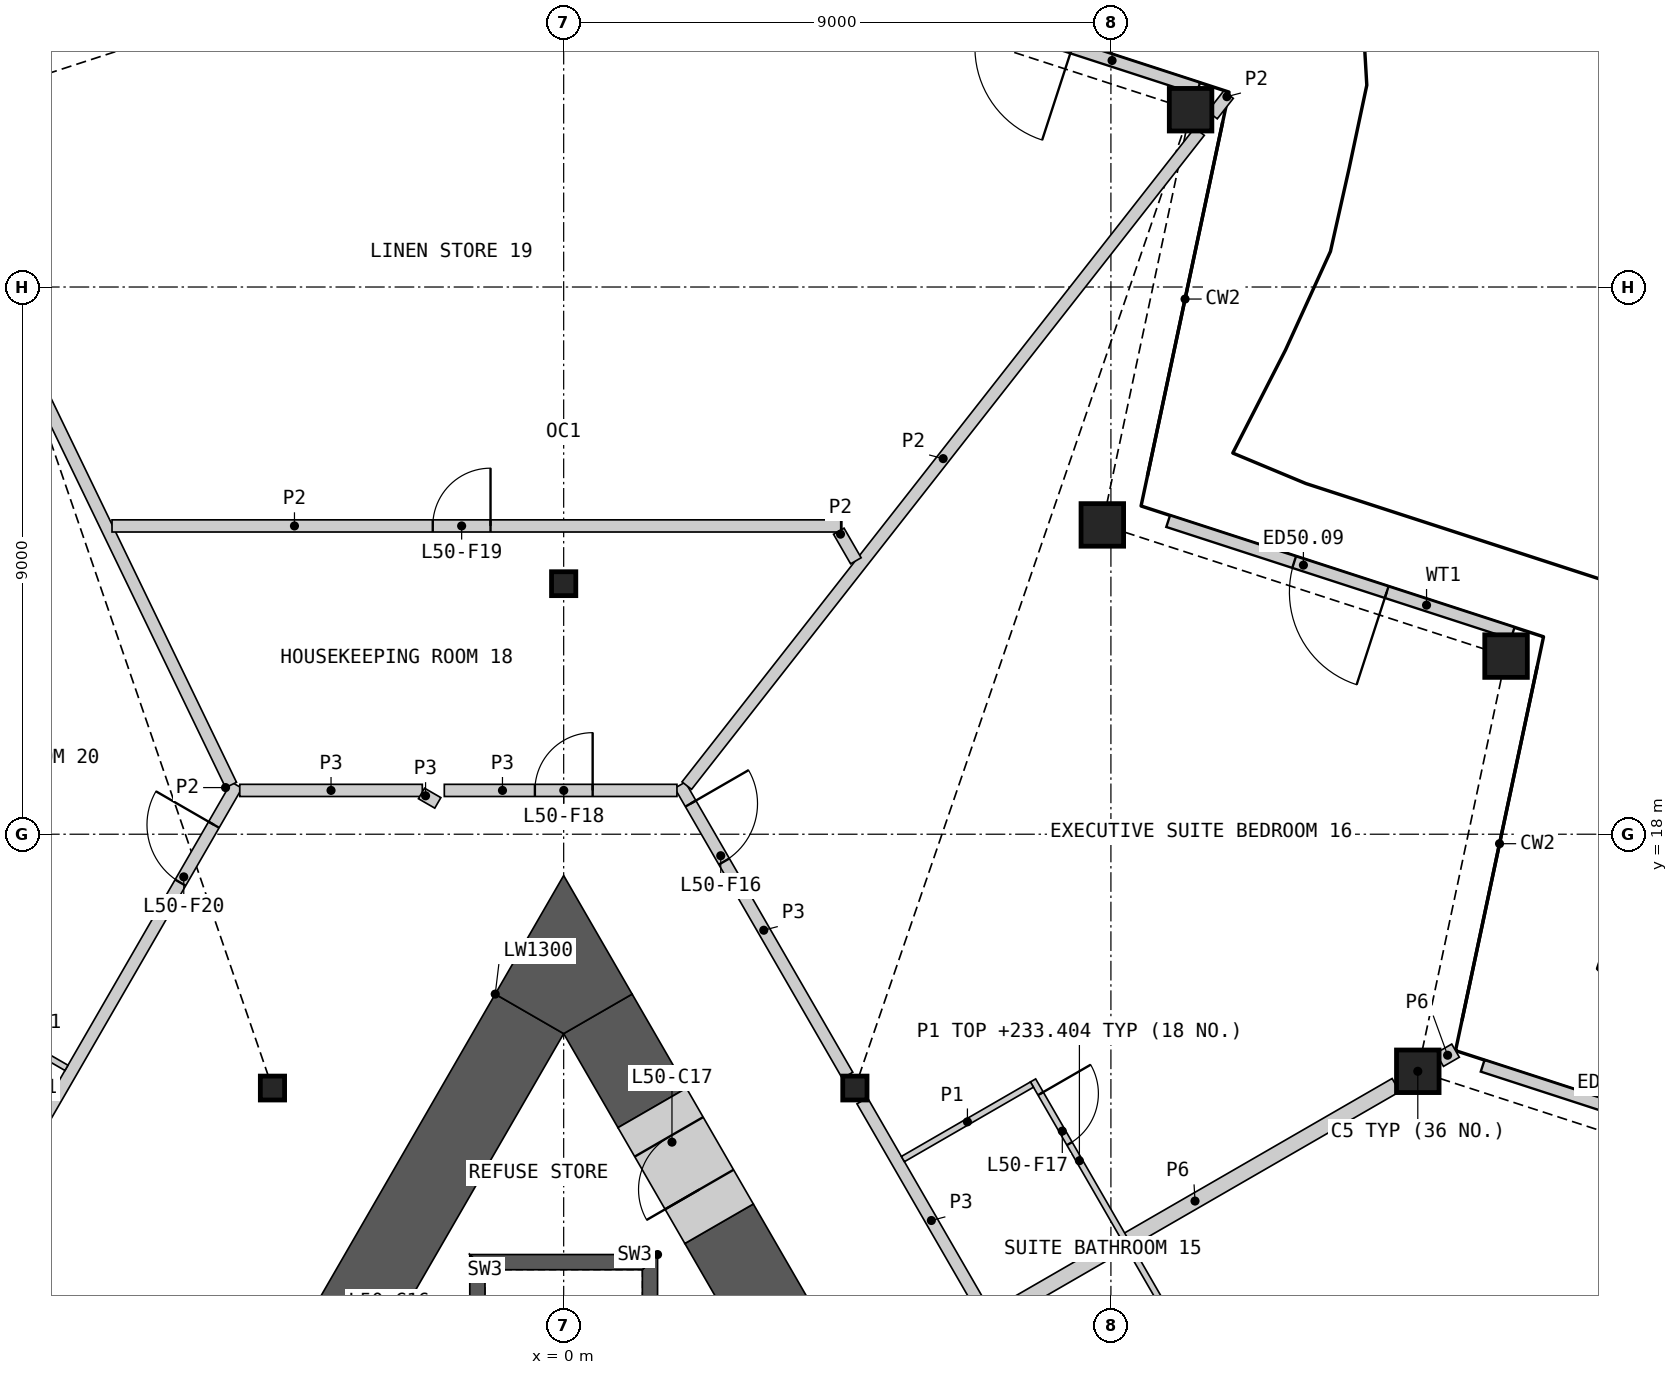
"""IFC4 building model, lengths in metres.
Left out: names, types, materials, properties, quantities, classifications, styles, units other than length and angle.
Written with IfcOpenShell. Run it as: python <this file> out.ifc"""

import sys

from ifc_helpers import new_model, si_unit, direction, frame, frame_2d, origin, origin_2d, place, context, subcontext, project, spatial, polyline, rectangle, hollow_rectangle, i_section, outline, extrude, element, fill, save


model = new_model("IFC4")
c1 = context("Model", 3, precision=1e-05, world=origin(), true_north=direction((0.0, 1.0)))
c2 = subcontext(c1, "Body", "Model", "MODEL_VIEW")
j1 = project(units=[si_unit("LENGTHUNIT", "METRE"), si_unit("PLANEANGLEUNIT", "RADIAN")], contexts=[c1])
p1 = place(None, origin())
s1 = spatial("IfcSite", under=j1, at=p1, CompositionType="ELEMENT")
p2 = place(p1, origin())
s2 = spatial("IfcBuilding", under=s1, at=p2, CompositionType="ELEMENT")
p3 = place(p2, frame((0.0, 0.0, 231.0)))
s3 = spatial("IfcBuildingStorey", under=s2, at=p3, CompositionType="ELEMENT", Elevation=231.0)
for number, where, z_axis, x_axis in (
    (1, (14.047, 14.101, 0.0), (0.0, 0.0, 1.0), (1.0, 0.0, 0.0)),
    (2, (15.499, 20.93, 0.0), (0.0, 0.0, 1.0), (1.0, 0.0, 0.0)),
    (3, (8.859, 23.087, 0.0), (0.0, 0.0, 1.0), (1.0, 0.0, 0.0)),
    (4, (10.31, 29.916, 0.0), (0.0, 0.0, 1.0), (1.0, 0.0, 0.0)),
):
    element("IfcColumn", number, at=place(p3, frame(where, z_axis=z_axis, x_axis=x_axis)), inside=s3, PredefinedType="COLUMN", context=c2, shape_type="SweptSolid", body=[
        extrude(hollow_rectangle(XDim=0.7, YDim=0.7, WallThickness=0.045, at=origin_2d()), origin(), (0.0, 0.0, 1.0), 3.6),
    ])
for number, where, z_axis, x_axis in (
    (5, (0.0, 22.121, 0.0), (0.0, 0.0, 1.0), (1.0, 0.0, 0.0)),
    (6, (-4.789, 13.825, 0.0), (0.0, 0.0, 1.0), (1.0, 0.0, 0.0)),
    (7, (4.789, 13.825, 0.0), (0.0, 0.0, 1.0), (1.0, 0.0, 0.0)),
):
    element("IfcColumn", number, at=place(p3, frame(where, z_axis=z_axis, x_axis=x_axis)), inside=s3, PredefinedType="COLUMN", context=c2, shape_type="SweptSolid", body=[
        extrude(i_section(OverallWidth=0.399, OverallDepth=0.393, WebThickness=0.023, FlangeThickness=0.037, at=origin_2d()), origin(), (0.0, 0.0, 1.0), 3.6),
    ])
p4 = place(p3, frame((20.779, 12.35, 0.0), z_axis=(0.0, 0.0, 1.0), x_axis=(-0.951065383831, 0.308989701572, 0.0)))
e8 = element("IfcWall", 8, at=p4, inside=s3, PredefinedType="SOLIDWALL", context=c2, shape_type="SweptSolid", body=[
    extrude(rectangle(XDim=5.958, YDim=0.2, at=frame_2d((2.979, 0.0))), origin(), (0.0, 0.0, 1.0), 2.701),
])
p5 = place(p4, frame((2.179, 0.0, 0.0)))
e9 = element("IfcOpeningElement", 9, at=p5, cuts=e8, PredefinedType="OPENING", context=c2, shape_type="SweptSolid", body=[
    extrude(rectangle(XDim=1.6, YDim=2.4, at=frame_2d((0.8, 1.2))), frame((0.0, 0.11, 0.0), z_axis=(0.0, -1.0, 0.0), x_axis=(1.0, 0.0, 0.0)), (0.0, 0.0, 1.0), 0.22),
])
p6 = place(p3, frame((15.607, 21.308, 0.0), z_axis=(0.0, 0.0, 1.0), x_axis=(-0.951065383831, 0.308989701572, 0.0)))
e10 = element("IfcWall", 10, at=p6, inside=s3, PredefinedType="SOLIDWALL", context=c2, shape_type="SweptSolid", body=[
    extrude(rectangle(XDim=5.958, YDim=0.2, at=frame_2d((2.979, 0.0))), origin(), (0.0, 0.0, 1.0), 2.701),
])
p7 = place(p6, frame((2.179, 0.0, 0.0)))
e11 = element("IfcOpeningElement", 11, at=p7, cuts=e10, PredefinedType="OPENING", context=c2, shape_type="SweptSolid", body=[
    extrude(rectangle(XDim=1.6, YDim=2.4, at=frame_2d((0.8, 1.2))), frame((0.0, 0.11, 0.0), z_axis=(0.0, -1.0, 0.0), x_axis=(1.0, 0.0, 0.0)), (0.0, 0.0, 1.0), 0.22),
])
p8 = place(p3, frame((10.435, 30.266, 0.0), z_axis=(0.0, 0.0, 1.0), x_axis=(-0.951061471046, 0.309001744805, 0.0)))
e12 = element("IfcWall", 12, at=p8, inside=s3, PredefinedType="SOLIDWALL", context=c2, shape_type="SweptSolid", body=[
    extrude(rectangle(XDim=5.957, YDim=0.2, at=frame_2d((2.979, 0.0))), origin(), (0.0, 0.0, 1.0), 2.701),
])
p9 = place(p8, frame((2.179, 0.0, 0.0)))
e13 = element("IfcOpeningElement", 13, at=p9, cuts=e12, PredefinedType="OPENING", context=c2, shape_type="SweptSolid", body=[
    extrude(rectangle(XDim=1.6, YDim=2.4, at=frame_2d((0.8, 1.2))), frame((0.0, 0.11, 0.0), z_axis=(0.0, -1.0, 0.0), x_axis=(1.0, 0.0, 0.0)), (0.0, 0.0, 1.0), 0.22),
])
p10 = place(p3, origin())
e14 = element("IfcWall", 14, at=p10, inside=s3, PredefinedType="SHEAR", context=c2, shape_type="SweptSolid", body=[
    extrude(outline(polyline([(1.544, 5.237), (1.544, 11.087), (1.294, 10.837), (1.294, 5.237), (1.544, 5.237)])), origin(), (0.0, 0.0, 1.0), 3.25),
])
p11 = place(p3, origin())
e15 = element("IfcWall", 15, at=p11, inside=s3, PredefinedType="SHEAR", context=c2, shape_type="SweptSolid", body=[
    extrude(outline(polyline([(1.544, 11.087), (-1.544, 11.087), (-1.294, 10.837), (1.294, 10.837), (1.544, 11.087)])), origin(), (0.0, 0.0, 1.0), 3.25),
])
p12 = place(p3, origin())
e16 = element("IfcWall", 16, at=p12, inside=s3, PredefinedType="SHEAR", context=c2, shape_type="SweptSolid", body=[
    extrude(outline(polyline([(-1.294, 10.837), (-1.544, 11.087), (-1.544, 5.237), (-1.294, 5.237), (-1.294, 10.837)])), origin(), (0.0, 0.0, 1.0), 3.25),
])
p13 = place(p3, frame((10.081, -1.441, 0.0), z_axis=(0.0, 0.0, 1.0), x_axis=(-0.500012180433, 0.866018371294, 0.0)))
e17 = element("IfcWall", 17, at=p13, inside=s3, PredefinedType="SHEAR", context=c2, shape_type="SweptSolid", body=[
    extrude(rectangle(XDim=15.05, YDim=1.3, at=frame_2d((7.525, 0.0))), origin(), (0.0, 0.0, 1.0), 3.25),
])
p14 = place(p3, frame((1.456, 13.499, 0.0), z_axis=(0.0, 0.0, 1.0), x_axis=(-0.499990639951, 0.866030807744, 0.0)))
e18 = element("IfcWall", 18, at=p14, inside=s3, PredefinedType="SHEAR", context=c2, shape_type="SweptSolid", body=[
    extrude(rectangle(XDim=1.786, YDim=1.3, at=frame_2d((0.893, 0.0))), origin(), (0.0, 0.0, 1.0), 3.25),
])
p15 = place(p3, frame((-0.563, 15.045, 0.0), z_axis=(0.0, 0.0, 1.0), x_axis=(-0.500011498138, -0.866018765229, 0.0)))
e19 = element("IfcWall", 19, at=p15, inside=s3, PredefinedType="SHEAR", context=c2, shape_type="SweptSolid", body=[
    extrude(rectangle(XDim=5.947, YDim=1.3, at=frame_2d((2.973, 0.0))), origin(), (0.0, 0.0, 1.0), 3.25),
])
p16 = place(p3, origin())
e20 = element("IfcWall", 20, at=p16, inside=s3, PredefinedType="SHEAR", context=c2, shape_type="SweptSolid", body=[
    extrude(outline(polyline([(-1.126, 15.371), (0.0, 17.321), (1.126, 15.371), (0.0, 14.72), (-1.126, 15.371)])), origin(), (0.0, 0.0, 1.0), 3.25),
])
p17 = place(p3, frame((2.556, 11.593, 0.0), z_axis=(0.0, 0.0, 1.0), x_axis=(-0.499946605688, 0.86605622881, 0.0)))
e21 = element("IfcWall", 21, at=p17, inside=s3, PredefinedType="SHEAR", context=c2, shape_type="SweptSolid", body=[
    extrude(rectangle(XDim=2.2, YDim=1.3, at=frame_2d((1.1, 0.0))), origin(), (0.0, 0.0, 1.0), 3.25),
])
p18 = place(p17, frame((0.65, 0.0, 0.0)))
e22 = element("IfcOpeningElement", 22, at=p18, cuts=e21, PredefinedType="OPENING", context=c2, shape_type="SweptSolid", body=[
    extrude(rectangle(XDim=1.0, YDim=2.1, at=frame_2d((0.5, 1.05))), frame((0.0, 0.66, 0.0), z_axis=(0.0, -1.0, 0.0), x_axis=(1.0, 0.0, 0.0)), (0.0, 0.0, 1.0), 1.32),
])
p19 = place(p3, frame((-18.976, -4.747, 0.0), z_axis=(0.0, 0.0, 1.0), x_axis=(0.499999852422, 0.866025488988, 0.0)))
e23 = element("IfcWall", 23, at=p19, inside=s3, PredefinedType="PARTITIONING", context=c2, shape_type="SweptSolid", body=[
    extrude(rectangle(XDim=27.198, YDim=0.2, at=frame_2d((13.599, 0.0))), origin(), (0.0, 0.0, 1.0), 3.25),
])
p20 = place(p19, frame((25.346, 0.0, 0.0)))
e24 = element("IfcOpeningElement", 24, at=p20, cuts=e23, PredefinedType="OPENING", context=c2, shape_type="SweptSolid", body=[
    extrude(rectangle(XDim=1.1, YDim=2.1, at=frame_2d((0.55, 1.05))), frame((0.0, 0.11, 0.0), z_axis=(0.0, -1.0, 0.0), x_axis=(1.0, 0.0, 0.0)), (0.0, 0.0, 1.0), 0.22),
])
p21 = place(p19, frame((16.713, 0.0, 0.0)))
e25 = element("IfcOpeningElement", 25, at=p21, cuts=e23, PredefinedType="OPENING", context=c2, shape_type="SweptSolid", body=[
    extrude(rectangle(XDim=1.1, YDim=2.1, at=frame_2d((0.55, 1.05))), frame((0.0, 0.11, 0.0), z_axis=(0.0, -1.0, 0.0), x_axis=(1.0, 0.0, 0.0)), (0.0, 0.0, 1.0), 0.22),
])
p22 = place(p19, frame((0.35, 0.0, 0.0)))
e26 = element("IfcOpeningElement", 26, at=p22, cuts=e23, PredefinedType="OPENING", context=c2, shape_type="SweptSolid", body=[
    extrude(rectangle(XDim=1.1, YDim=2.1, at=frame_2d((0.55, 1.05))), frame((0.0, 0.11, 0.0), z_axis=(0.0, -1.0, 0.0), x_axis=(1.0, 0.0, 0.0)), (0.0, 0.0, 1.0), 0.22),
])
p23 = place(p3, frame((4.91, 13.616, 0.0), z_axis=(0.0, 0.0, 1.0), x_axis=(0.50000207303, -0.866024206917, 0.0)))
e27 = element("IfcWall", 27, at=p23, inside=s3, PredefinedType="PARTITIONING", context=c2, shape_type="SweptSolid", body=[
    extrude(rectangle(XDim=9.095, YDim=0.2, at=frame_2d((4.547, 0.0))), origin(), (0.0, 0.0, 1.0), 3.25),
])
p24 = place(p3, frame((7.079, 10.059, 0.0), z_axis=(0.0, 0.0, 1.0), x_axis=(0.866033195618, 0.499986503906, 0.0)))
e28 = element("IfcWall", 28, at=p24, inside=s3, PredefinedType="PARTITIONING", context=c2, shape_type="SweptSolid", body=[
    extrude(rectangle(XDim=7.63, YDim=0.25, at=frame_2d((3.815, 0.0))), origin(), (0.0, 0.0, 1.0), 2.404),
])
p25 = place(p3, frame((1.913, 18.807, 0.0), z_axis=(0.0, 0.0, 1.0), x_axis=(0.499984524817, -0.866034338201, 0.0)))
e29 = element("IfcWall", 29, at=p25, inside=s3, PredefinedType="PARTITIONING", context=c2, shape_type="SweptSolid", body=[
    extrude(rectangle(XDim=5.51, YDim=0.2, at=frame_2d((2.755, 0.0))), origin(), (0.0, 0.0, 1.0), 3.25),
])
p26 = place(p25, frame((0.35, 0.0, 0.0)))
e30 = element("IfcOpeningElement", 30, at=p26, cuts=e29, PredefinedType="OPENING", context=c2, shape_type="SweptSolid", body=[
    extrude(rectangle(XDim=1.1, YDim=2.1, at=frame_2d((0.55, 1.05))), frame((0.0, 0.11, 0.0), z_axis=(0.0, -1.0, 0.0), x_axis=(1.0, 0.0, 0.0)), (0.0, 0.0, 1.0), 0.22),
])
p27 = place(p3, frame((-1.963, 18.72, 0.0), z_axis=(0.0, 0.0, 1.0), x_axis=(1.0, 0.0, 0.0)))
e31 = element("IfcWall", 31, at=p27, inside=s3, PredefinedType="PARTITIONING", context=c2, shape_type="SweptSolid", body=[
    extrude(rectangle(XDim=3.826, YDim=0.2, at=frame_2d((1.913, 0.0))), origin(), (0.0, 0.0, 1.0), 3.25),
])
p28 = place(p27, frame((1.49, 0.0, 0.0)))
e32 = element("IfcOpeningElement", 32, at=p28, cuts=e31, PredefinedType="OPENING", context=c2, shape_type="SweptSolid", body=[
    extrude(rectangle(XDim=0.95, YDim=2.1, at=frame_2d((0.475, 1.05))), frame((0.0, 0.11, 0.0), z_axis=(0.0, -1.0, 0.0), x_axis=(1.0, 0.0, 0.0)), (0.0, 0.0, 1.0), 0.22),
])
p29 = place(p3, frame((-5.327, 18.72, 0.0), z_axis=(0.0, 0.0, 1.0), x_axis=(1.0, 0.0, 0.0)))
e33 = element("IfcWall", 33, at=p29, inside=s3, PredefinedType="PARTITIONING", context=c2, shape_type="SweptSolid", body=[
    extrude(rectangle(XDim=3.002, YDim=0.2, at=frame_2d((1.501, 0.0))), origin(), (0.0, 0.0, 1.0), 3.25),
])
p30 = place(p3, frame((-2.338, 18.67, 0.0), z_axis=(0.0, 0.0, 1.0), x_axis=(0.866054481515, -0.499949632511, 0.0)))
e34 = element("IfcWall", 34, at=p30, inside=s3, PredefinedType="PARTITIONING", context=c2, shape_type="SweptSolid", body=[
    extrude(rectangle(XDim=0.31, YDim=0.2, at=frame_2d((0.155, 0.0))), origin(), (0.0, 0.0, 1.0), 3.25),
])
p31 = place(p3, frame((14.407, 14.29, 0.0), z_axis=(0.0, 0.0, 1.0), x_axis=(0.865888485494, 0.500237074485, 0.0)))
e35 = element("IfcWall", 35, at=p31, inside=s3, PredefinedType="PARTITIONING", context=c2, shape_type="SweptSolid", body=[
    extrude(rectangle(XDim=0.301, YDim=0.25, at=frame_2d((0.15, 0.0))), origin(), (0.0, 0.0, 1.0), 2.404),
])
p32 = place(p3, frame((2.025, 18.799, 0.0), z_axis=(0.0, 0.0, 1.0), x_axis=(0.616942368609, 0.787008331478, 0.0)))
e36 = element("IfcWall", 36, at=p32, inside=s3, PredefinedType="PARTITIONING", context=c2, shape_type="SweptSolid", body=[
    extrude(rectangle(XDim=13.668, YDim=0.2, at=frame_2d((6.834, 0.0))), origin(), (0.0, 0.0, 1.0), 2.404),
])
p33 = place(p3, origin())
e37 = element("IfcWall", 37, at=p33, inside=s3, PredefinedType="PARTITIONING", context=c2, shape_type="SweptSolid", body=[
    extrude(outline(polyline([(-5.561, 18.767), (-10.466, 28.923), (-10.64, 29.745), (-5.381, 18.854), (-5.561, 18.767)])), origin(), (0.0, 0.0, 1.0), 2.404),
])
p34 = place(p3, frame((-7.428, 23.071, 0.0), z_axis=(0.0, 0.0, 1.0), x_axis=(1.0, 0.0, 0.0)))
e38 = element("IfcWall", 38, at=p34, inside=s3, PredefinedType="PARTITIONING", context=c2, shape_type="SweptSolid", body=[
    extrude(rectangle(XDim=12.002, YDim=0.2, at=frame_2d((6.001, 0.0))), origin(), (0.0, 0.0, 1.0), 2.404),
])
p35 = place(p34, frame((5.275, 0.0, 0.0)))
e39 = element("IfcOpeningElement", 39, at=p35, cuts=e38, PredefinedType="OPENING", context=c2, shape_type="SweptSolid", body=[
    extrude(rectangle(XDim=0.95, YDim=2.1, at=frame_2d((0.475, 1.05))), frame((0.0, 0.11, 0.0), z_axis=(0.0, -1.0, 0.0), x_axis=(1.0, 0.0, 0.0)), (0.0, 0.0, 1.0), 0.22),
])
p36 = place(p3, frame((4.524, 22.984, 0.0), z_axis=(0.0, 0.0, 1.0), x_axis=(0.500248658738, -0.865881792989, 0.0)))
e40 = element("IfcWall", 40, at=p36, inside=s3, PredefinedType="PARTITIONING", context=c2, shape_type="SweptSolid", body=[
    extrude(rectangle(XDim=0.562, YDim=0.2, at=frame_2d((0.281, 0.0))), origin(), (0.0, 0.0, 1.0), 2.404),
])
p37 = place(p3, frame((10.67, 29.828, 0.0), z_axis=(0.0, 0.0, 1.0), x_axis=(0.617216179113, 0.786793612227, 0.0)))
e41 = element("IfcWall", 41, at=p37, inside=s3, PredefinedType="PARTITIONING", context=c2, shape_type="SweptSolid", body=[
    extrude(rectangle(XDim=0.427, YDim=0.2, at=frame_2d((0.214, 0.0))), origin(), (0.0, 0.0, 1.0), 2.404),
])
p38 = place(p3, frame((7.719, 13.95, 0.0), z_axis=(0.0, 0.0, 1.0), x_axis=(0.500008851346, -0.866020293397, 0.0)))
e42 = element("IfcWall", 42, at=p38, inside=s3, PredefinedType="PARTITIONING", context=c2, shape_type="SweptSolid", body=[
    extrude(rectangle(XDim=6.1, YDim=0.1, at=frame_2d((3.05, 0.0))), origin(), (0.0, 0.0, 1.0), 2.404),
])
p39 = place(p38, frame((4.9, 0.0, 0.0)))
e43 = element("IfcOpeningElement", 43, at=p39, cuts=e42, PredefinedType="OPENING", context=c2, shape_type="SweptSolid", body=[
    extrude(rectangle(XDim=0.95, YDim=2.1, at=frame_2d((0.475, 1.05))), frame((0.0, 0.06, 0.0), z_axis=(0.0, -1.0, 0.0), x_axis=(1.0, 0.0, 0.0)), (0.0, 0.0, 1.0), 0.12),
])
p40 = place(p38, frame((0.25, 0.0, 0.0)))
e44 = element("IfcOpeningElement", 44, at=p40, cuts=e42, PredefinedType="OPENING", context=c2, shape_type="SweptSolid", body=[
    extrude(rectangle(XDim=0.95, YDim=2.1, at=frame_2d((0.475, 1.05))), frame((0.0, 0.06, 0.0), z_axis=(0.0, -1.0, 0.0), x_axis=(1.0, 0.0, 0.0)), (0.0, 0.0, 1.0), 0.12),
])
p41 = place(p3, frame((-10.299, 15.382, 0.0), z_axis=(0.0, 0.0, 1.0), x_axis=(0.866057815567, -0.499943856944, 0.0)))
e45 = element("IfcWall", 45, at=p41, inside=s3, PredefinedType="PARTITIONING", context=c2, shape_type="SweptSolid", body=[
    extrude(rectangle(XDim=2.45, YDim=0.1, at=frame_2d((1.225, 0.0))), origin(), (0.0, 0.0, 1.0), 2.404),
])
p42 = place(p41, frame((0.25, 0.0, 0.0)))
e46 = element("IfcOpeningElement", 46, at=p42, cuts=e45, PredefinedType="OPENING", context=c2, shape_type="SweptSolid", body=[
    extrude(rectangle(XDim=0.95, YDim=2.1, at=frame_2d((0.475, 1.05))), frame((0.0, 0.06, 0.0), z_axis=(0.0, -1.0, 0.0), x_axis=(1.0, 0.0, 0.0)), (0.0, 0.0, 1.0), 0.12),
])
p43 = place(p3, frame((5.579, 12.657, 0.0), z_axis=(0.0, 0.0, 1.0), x_axis=(0.866057815567, 0.499943856944, 0.0)))
e47 = element("IfcWall", 47, at=p43, inside=s3, PredefinedType="PARTITIONING", context=c2, shape_type="SweptSolid", body=[
    extrude(rectangle(XDim=2.45, YDim=0.1, at=frame_2d((1.225, 0.0))), origin(), (0.0, 0.0, 1.0), 2.404),
])
p44 = place(p7, origin())
e48 = element("IfcDoor", 48, at=p44, inside=s3, OperationType="DOUBLE_DOOR_SINGLE_SWING", PredefinedType="DOOR", context=c2, shape_type="SweptSolid", body=[
    extrude(rectangle(XDim=1.6, YDim=2.4, at=frame_2d((0.8, 1.2))), frame((0.0, 0.025, 0.0), z_axis=(0.0, -1.0, 0.0), x_axis=(1.0, 0.0, 0.0)), (0.0, 0.0, 1.0), 0.05),
])
fill(e11, e48)
p45 = place(p18, origin())
e49 = element("IfcDoor", 49, at=p45, inside=s3, OperationType="SINGLE_SWING_LEFT", PredefinedType="DOOR", context=c2, shape_type="SweptSolid", body=[
    extrude(rectangle(XDim=1.0, YDim=2.1, at=frame_2d((0.5, 1.05))), frame((0.0, 0.405, 0.0), z_axis=(0.0, -1.0, 0.0), x_axis=(1.0, 0.0, 0.0)), (0.0, 0.0, 1.0), 0.05),
])
fill(e22, e49)
p46 = place(p26, origin())
e50 = element("IfcDoor", 50, at=p46, inside=s3, OperationType="SINGLE_SWING_LEFT", PredefinedType="DOOR", context=c2, shape_type="SweptSolid", body=[
    extrude(rectangle(XDim=1.1, YDim=2.1, at=frame_2d((0.55, 1.05))), frame((0.0, 0.025, 0.0), z_axis=(0.0, -1.0, 0.0), x_axis=(1.0, 0.0, 0.0)), (0.0, 0.0, 1.0), 0.05),
])
fill(e30, e50)
p47 = place(p40, origin())
e51 = element("IfcDoor", 51, at=p47, inside=s3, OperationType="SINGLE_SWING_LEFT", PredefinedType="DOOR", context=c2, shape_type="SweptSolid", body=[
    extrude(rectangle(XDim=0.95, YDim=2.1, at=frame_2d((0.475, 1.05))), frame((0.0, 0.025, 0.0), z_axis=(0.0, -1.0, 0.0), x_axis=(1.0, 0.0, 0.0)), (0.0, 0.0, 1.0), 0.05),
])
fill(e44, e51)
p48 = place(p28, origin())
e52 = element("IfcDoor", 52, at=p48, inside=s3, OperationType="SINGLE_SWING_RIGHT", PredefinedType="DOOR", context=c2, shape_type="SweptSolid", body=[
    extrude(rectangle(XDim=0.95, YDim=2.1, at=frame_2d((0.475, 1.05))), frame((0.0, 0.025, 0.0), z_axis=(0.0, -1.0, 0.0), x_axis=(1.0, 0.0, 0.0)), (0.0, 0.0, 1.0), 0.05),
])
fill(e32, e52)
p49 = place(p35, origin())
e53 = element("IfcDoor", 53, at=p49, inside=s3, OperationType="SINGLE_SWING_RIGHT", PredefinedType="DOOR", context=c2, shape_type="SweptSolid", body=[
    extrude(rectangle(XDim=0.95, YDim=2.1, at=frame_2d((0.475, 1.05))), frame((0.0, 0.025, 0.0), z_axis=(0.0, -1.0, 0.0), x_axis=(1.0, 0.0, 0.0)), (0.0, 0.0, 1.0), 0.05),
])
fill(e39, e53)
p50 = place(p20, origin())
e54 = element("IfcDoor", 54, at=p50, inside=s3, OperationType="SINGLE_SWING_RIGHT", PredefinedType="DOOR", context=c2, shape_type="SweptSolid", body=[
    extrude(rectangle(XDim=1.1, YDim=2.1, at=frame_2d((0.55, 1.05))), frame((0.0, 0.025, 0.0), z_axis=(0.0, -1.0, 0.0), x_axis=(1.0, 0.0, 0.0)), (0.0, 0.0, 1.0), 0.05),
])
fill(e24, e54)
save(model, sys.argv[1])
